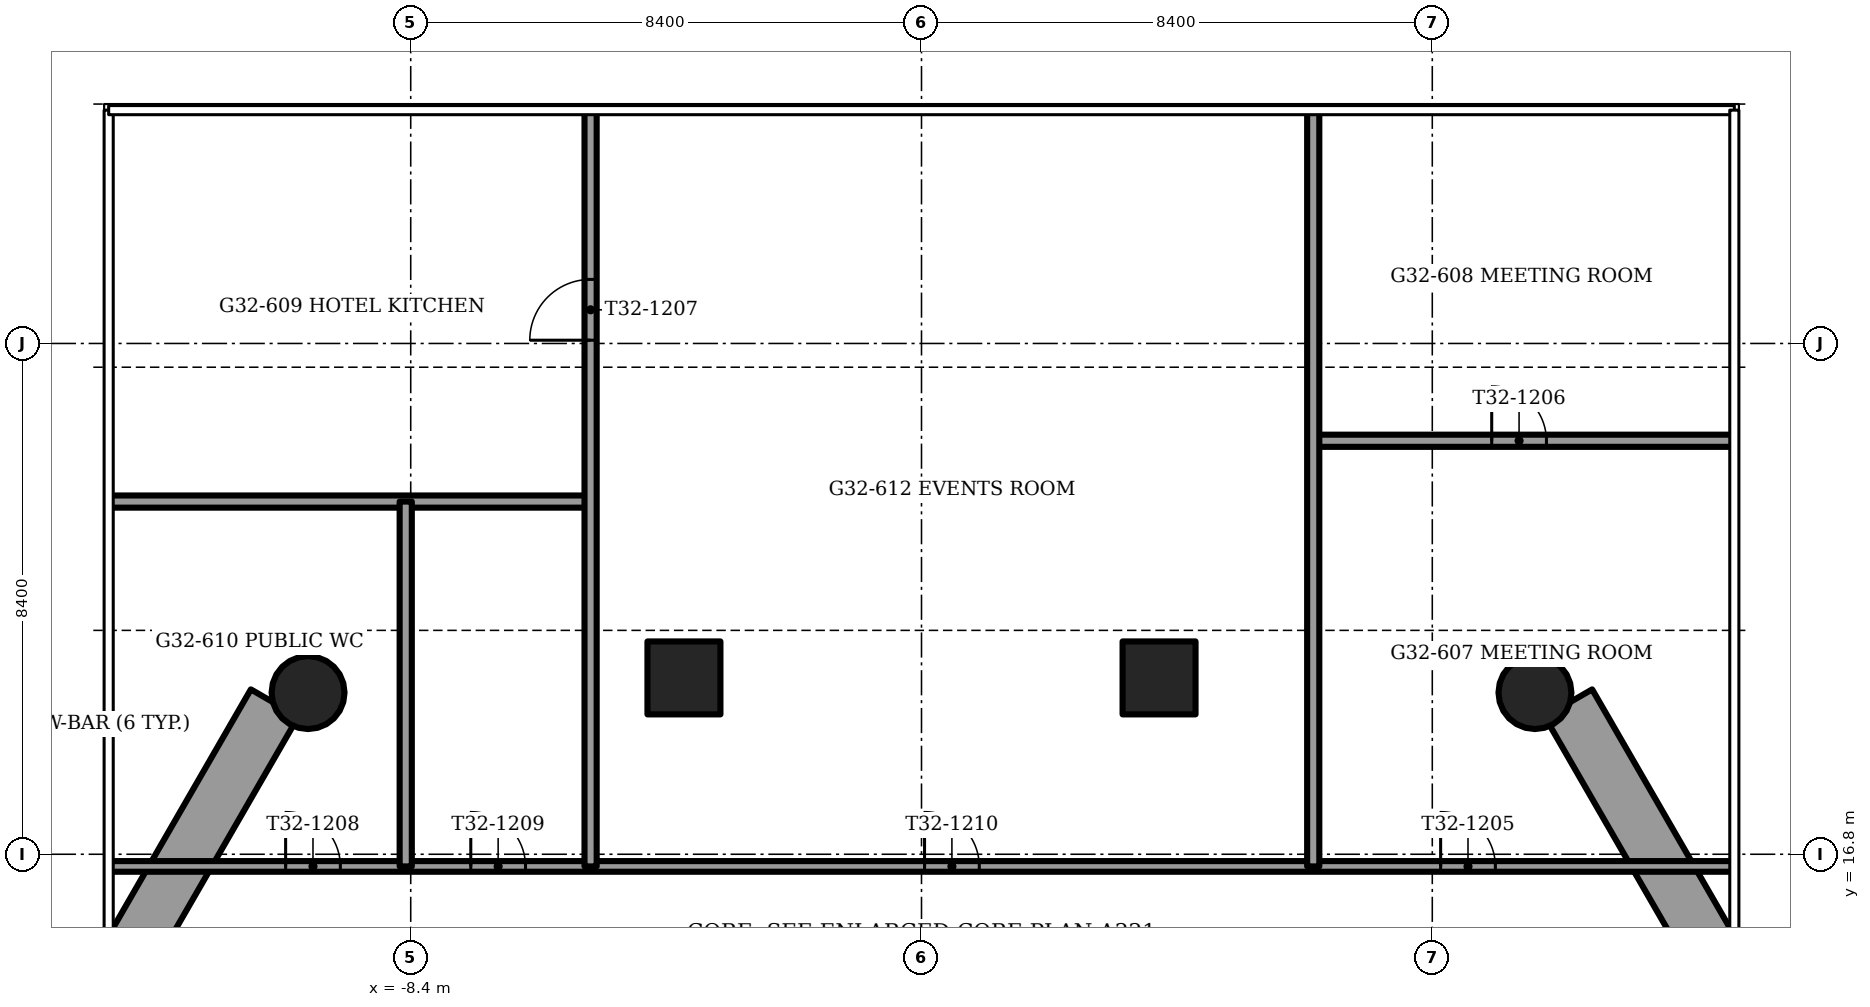
"""IFC4 building model, lengths in metres.
Left out: names, types, materials, properties, quantities, classifications, styles, units other than length and angle.
Written with IfcOpenShell. Run it as: python <this file> out.ifc"""

import sys

from ifc_helpers import new_model, si_unit, direction, frame, frame_2d, origin, origin_2d, place, context, subcontext, project, spatial, rectangle, circle, extrude, element, fill, save


model = new_model("IFC4")
c1 = context("Model", 3, precision=1e-05, world=origin(), true_north=direction((0.0, 1.0)))
c2 = subcontext(c1, "Body", "Model", "MODEL_VIEW")
j1 = project(units=[si_unit("LENGTHUNIT", "METRE"), si_unit("PLANEANGLEUNIT", "RADIAN")], contexts=[c1])
p1 = place(None, origin())
s1 = spatial("IfcSite", under=j1, at=p1, CompositionType="ELEMENT")
p2 = place(p1, origin())
s2 = spatial("IfcBuilding", under=s1, at=p2, CompositionType="ELEMENT")
p3 = place(p2, frame((0.0, 0.0, 131.0)))
s3 = spatial("IfcBuildingStorey", under=s2, at=p3, CompositionType="ELEMENT", Elevation=131.0)
for number, where, z_axis, x_axis in (
    (1, (-10.088, 19.459, -1.2), (0.0, 0.0, 1.0), (1.0, 0.0, 0.0)),
    (2, (10.088, 19.459, -1.2), (0.0, 0.0, 1.0), (1.0, 0.0, 0.0)),
):
    element("IfcColumn", number, at=place(p3, frame(where, z_axis=z_axis, x_axis=x_axis)), inside=s3, PredefinedType="COLUMN", context=c2, shape_type="SweptSolid", body=[
        extrude(circle(Radius=0.6, at=origin_2d()), origin(), (0.0, 0.0, 1.0), 3.75),
    ])
for number, where, z_axis, x_axis in (
    (3, (3.907, 19.7, -1.2), (0.0, 0.0, 1.0), (1.0, 0.0, 0.0)),
    (4, (-3.907, 19.7, -1.2), (0.0, 0.0, 1.0), (1.0, 0.0, 0.0)),
):
    element("IfcColumn", number, at=place(p3, frame(where, z_axis=z_axis, x_axis=x_axis)), inside=s3, PredefinedType="COLUMN", context=c2, shape_type="SweptSolid", body=[
        extrude(rectangle(XDim=1.2, YDim=1.2, at=origin_2d()), origin(), (0.0, 0.0, 1.0), 3.75),
    ])
for number, where, z_axis, x_axis in (
    (5, (-10.639, 19.286, 0.0), (0.0, 0.0, 1.0), (-0.5, -0.866, 0.0)),
    (6, (14.092, 13.306, 0.0), (0.0, 0.0, 1.0), (-0.5, 0.866, 0.0)),
):
    element("IfcWall", number, at=place(p3, frame(where, z_axis=z_axis, x_axis=x_axis)), inside=s3, PredefinedType="PARAPET", context=c2, shape_type="SweptSolid", body=[
        extrude(rectangle(XDim=6.906, YDim=0.9, at=frame_2d((3.453, 0.0))), origin(), (0.0, 0.0, 1.0), 1.1),
    ])
p4 = place(p3, frame((-13.348, 16.6, 0.0), z_axis=(0.0, 0.0, 1.0), x_axis=(1.0, 0.0, 0.0)))
e7 = element("IfcWall", 7, at=p4, inside=s3, PredefinedType="PARTITIONING", context=c2, shape_type="SweptSolid", body=[
    extrude(rectangle(XDim=26.696, YDim=0.175, at=frame_2d((13.348, 0.0))), origin(), (0.0, 0.0, 1.0), 2.25),
])
p5 = place(p4, frame((21.885, 0.0, 0.0)))
e8 = element("IfcOpeningElement", 8, at=p5, cuts=e7, PredefinedType="OPENING", context=c2, shape_type="SweptSolid", body=[
    extrude(rectangle(XDim=0.9, YDim=2.1, at=frame_2d((0.45, 1.05))), frame((0.0, 0.087, 0.0), z_axis=(0.0, -1.0, 0.0), x_axis=(1.0, 0.0, 0.0)), (0.0, 0.0, 1.0), 0.175),
])
p6 = place(p4, frame((2.891, 0.0, 0.0)))
e9 = element("IfcOpeningElement", 9, at=p6, cuts=e7, PredefinedType="OPENING", context=c2, shape_type="SweptSolid", body=[
    extrude(rectangle(XDim=0.9, YDim=2.1, at=frame_2d((0.45, 1.05))), frame((0.0, 0.087, 0.0), z_axis=(0.0, -1.0, 0.0), x_axis=(1.0, 0.0, 0.0)), (0.0, 0.0, 1.0), 0.175),
])
p7 = place(p4, frame((5.936, 0.0, 0.0)))
e10 = element("IfcOpeningElement", 10, at=p7, cuts=e7, PredefinedType="OPENING", context=c2, shape_type="SweptSolid", body=[
    extrude(rectangle(XDim=0.9, YDim=2.1, at=frame_2d((0.45, 1.05))), frame((0.0, 0.087, 0.0), z_axis=(0.0, -1.0, 0.0), x_axis=(1.0, 0.0, 0.0)), (0.0, 0.0, 1.0), 0.175),
])
p8 = place(p4, frame((13.398, 0.0, 0.0)))
e11 = element("IfcOpeningElement", 11, at=p8, cuts=e7, PredefinedType="OPENING", context=c2, shape_type="SweptSolid", body=[
    extrude(rectangle(XDim=0.9, YDim=2.1, at=frame_2d((0.45, 1.05))), frame((0.0, 0.087, 0.0), z_axis=(0.0, -1.0, 0.0), x_axis=(1.0, 0.0, 0.0)), (0.0, 0.0, 1.0), 0.175),
])
p9 = place(p3, frame((-13.348, 22.6, 0.0), z_axis=(0.0, 0.0, 1.0), x_axis=(1.0, 0.0, 0.0)))
e12 = element("IfcWall", 12, at=p9, inside=s3, PredefinedType="PARTITIONING", context=c2, shape_type="SweptSolid", body=[
    extrude(rectangle(XDim=7.906, YDim=0.2, at=frame_2d((3.953, 0.0))), origin(), (0.0, 0.0, 1.0), 3.45),
])
p10 = place(p3, frame((6.442, 23.6, 0.0), z_axis=(0.0, 0.0, 1.0), x_axis=(1.0, 0.0, 0.0)))
e13 = element("IfcWall", 13, at=p10, inside=s3, PredefinedType="PARTITIONING", context=c2, shape_type="SweptSolid", body=[
    extrude(rectangle(XDim=6.906, YDim=0.2, at=frame_2d((3.453, 0.0))), origin(), (0.0, 0.0, 1.0), 3.45),
])
p11 = place(p10, frame((2.935, 0.0, 0.0)))
e14 = element("IfcOpeningElement", 14, at=p11, cuts=e13, PredefinedType="OPENING", context=c2, shape_type="SweptSolid", body=[
    extrude(rectangle(XDim=0.9, YDim=2.1, at=frame_2d((0.45, 1.05))), frame((0.0, 0.1, 0.0), z_axis=(0.0, -1.0, 0.0), x_axis=(1.0, 0.0, 0.0)), (0.0, 0.0, 1.0), 0.2),
])
p12 = place(p3, frame((-8.482, 16.6, 0.0), z_axis=(0.0, 0.0, 1.0), x_axis=(0.0, 1.0, 0.0)))
e15 = element("IfcWall", 15, at=p12, inside=s3, PredefinedType="PARTITIONING", context=c2, shape_type="SweptSolid", body=[
    extrude(rectangle(XDim=6.0, YDim=0.2, at=frame_2d((3.0, 0.0))), origin(), (0.0, 0.0, 1.0), 2.828),
])
p13 = place(p3, frame((-5.442, 16.6, 0.0), z_axis=(0.0, 0.0, 1.0), x_axis=(0.0, 1.0, 0.0)))
e16 = element("IfcWall", 16, at=p13, inside=s3, PredefinedType="PARTITIONING", context=c2, shape_type="SweptSolid", body=[
    extrude(rectangle(XDim=12.418, YDim=0.2, at=frame_2d((6.209, 0.0))), origin(), (0.0, 0.0, 1.0), 2.828),
])
p14 = place(p13, frame((8.654, 0.0, 0.0)))
e17 = element("IfcOpeningElement", 17, at=p14, cuts=e16, PredefinedType="OPENING", context=c2, shape_type="SweptSolid", body=[
    extrude(rectangle(XDim=1.0, YDim=2.1, at=frame_2d((0.5, 1.05))), frame((0.0, 0.1, 0.0), z_axis=(0.0, -1.0, 0.0), x_axis=(1.0, 0.0, 0.0)), (0.0, 0.0, 1.0), 0.2),
])
p15 = place(p3, frame((6.442, 16.6, 0.0), z_axis=(0.0, 0.0, 1.0), x_axis=(0.0, 1.0, 0.0)))
e18 = element("IfcWall", 18, at=p15, inside=s3, PredefinedType="PARTITIONING", context=c2, shape_type="SweptSolid", body=[
    extrude(rectangle(XDim=12.418, YDim=0.2, at=frame_2d((6.209, 0.0))), origin(), (0.0, 0.0, 1.0), 2.828),
])
p16 = place(p5, origin())
e19 = element("IfcDoor", 19, at=p16, inside=s3, OperationType="SINGLE_SWING_LEFT", PredefinedType="DOOR", context=c2, shape_type="SweptSolid", body=[
    extrude(rectangle(XDim=0.9, YDim=2.1, at=frame_2d((0.45, 1.05))), frame((0.0, 0.025, 0.0), z_axis=(0.0, -1.0, 0.0), x_axis=(1.0, 0.0, 0.0)), (0.0, 0.0, 1.0), 0.05),
])
fill(e8, e19)
p17 = place(p11, origin())
e20 = element("IfcDoor", 20, at=p17, inside=s3, OperationType="SINGLE_SWING_RIGHT", PredefinedType="DOOR", context=c2, shape_type="SweptSolid", body=[
    extrude(rectangle(XDim=0.9, YDim=2.1, at=frame_2d((0.45, 1.05))), frame((0.0, 0.025, 0.0), z_axis=(0.0, -1.0, 0.0), x_axis=(1.0, 0.0, 0.0)), (0.0, 0.0, 1.0), 0.05),
])
fill(e14, e20)
p18 = place(p14, origin())
e21 = element("IfcDoor", 21, at=p18, inside=s3, OperationType="SINGLE_SWING_LEFT", PredefinedType="DOOR", context=c2, shape_type="SweptSolid", body=[
    extrude(rectangle(XDim=1.0, YDim=2.1, at=frame_2d((0.5, 1.05))), frame((0.0, 0.025, 0.0), z_axis=(0.0, -1.0, 0.0), x_axis=(1.0, 0.0, 0.0)), (0.0, 0.0, 1.0), 0.05),
])
fill(e17, e21)
p19 = place(p6, origin())
e22 = element("IfcDoor", 22, at=p19, inside=s3, OperationType="SINGLE_SWING_RIGHT", PredefinedType="DOOR", context=c2, shape_type="SweptSolid", body=[
    extrude(rectangle(XDim=0.9, YDim=2.1, at=frame_2d((0.45, 1.05))), frame((0.0, 0.025, 0.0), z_axis=(0.0, -1.0, 0.0), x_axis=(1.0, 0.0, 0.0)), (0.0, 0.0, 1.0), 0.05),
])
fill(e9, e22)
p20 = place(p7, origin())
e23 = element("IfcDoor", 23, at=p20, inside=s3, OperationType="SINGLE_SWING_LEFT", PredefinedType="DOOR", context=c2, shape_type="SweptSolid", body=[
    extrude(rectangle(XDim=0.9, YDim=2.1, at=frame_2d((0.45, 1.05))), frame((0.0, 0.025, 0.0), z_axis=(0.0, -1.0, 0.0), x_axis=(1.0, 0.0, 0.0)), (0.0, 0.0, 1.0), 0.05),
])
fill(e10, e23)
p21 = place(p8, origin())
e24 = element("IfcDoor", 24, at=p21, inside=s3, OperationType="SINGLE_SWING_RIGHT", PredefinedType="DOOR", context=c2, shape_type="SweptSolid", body=[
    extrude(rectangle(XDim=0.9, YDim=2.1, at=frame_2d((0.45, 1.05))), frame((0.0, 0.025, 0.0), z_axis=(0.0, -1.0, 0.0), x_axis=(1.0, 0.0, 0.0)), (0.0, 0.0, 1.0), 0.05),
])
fill(e11, e24)
save(model, sys.argv[1])
